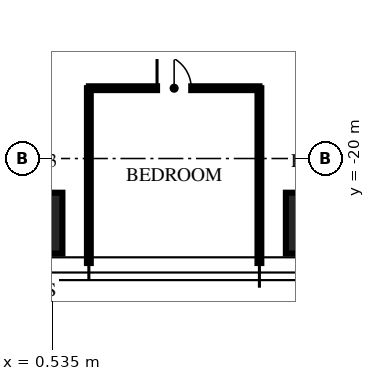
"""IFC4 building model, lengths in metres.
Left out: names, types, materials, properties, quantities, classifications, styles, units other than length and angle.
Written with IfcOpenShell. Run it as: python <this file> out.ifc"""

import sys

from ifc_helpers import new_model, si_unit, direction, frame, frame_2d, origin, origin_2d, place, context, subcontext, project, spatial, rectangle, extrude, element, fill, save


model = new_model("IFC4")
c1 = context("Model", 3, precision=1e-05, world=origin(), true_north=direction((0.0, 1.0)))
c2 = subcontext(c1, "Body", "Model", "MODEL_VIEW")
j1 = project(units=[si_unit("LENGTHUNIT", "METRE"), si_unit("PLANEANGLEUNIT", "RADIAN")], contexts=[c1])
p1 = place(None, origin())
s1 = spatial("IfcSite", under=j1, at=p1, CompositionType="ELEMENT")
p2 = place(p1, origin())
s2 = spatial("IfcBuilding", under=s1, at=p2, CompositionType="ELEMENT")
p3 = place(p2, frame((0.0, 0.0, 342.0)))
s3 = spatial("IfcBuildingStorey", under=s2, at=p3, CompositionType="ELEMENT", Elevation=342.0)
for number, where, z_axis, x_axis in (
    (1, (7.48, -21.7, 0.0), (0.0, 0.0, 1.0), (1.0, 0.0, 0.0)),
    (2, (0.0, -21.7, 0.0), (0.0, 0.0, 1.0), (1.0, 0.0, 0.0)),
):
    element("IfcColumn", number, at=place(p3, frame(where, z_axis=z_axis, x_axis=x_axis)), inside=s3, PredefinedType="COLUMN", context=c2, shape_type="SweptSolid", body=[
        extrude(rectangle(XDim=1.6, YDim=1.6, at=origin_2d()), origin(), (0.0, 0.0, 1.0), 3.75),
    ])
for number, where, z_axis, x_axis in (
    (3, (1.496, -18.15, 0.0), (0.0, 0.0, 1.0), (0.0, -1.0, 0.0)),
    (4, (5.984, -18.15, 0.0), (0.0, 0.0, 1.0), (0.0, -1.0, 0.0)),
):
    element("IfcWall", number, at=place(p3, frame(where, z_axis=z_axis, x_axis=x_axis)), inside=s3, PredefinedType="PARTITIONING", context=c2, shape_type="SweptSolid", body=[
        extrude(rectangle(XDim=4.6, YDim=0.1, at=frame_2d((2.3, 0.0))), origin(), (0.0, 0.0, 1.0), 3.01),
    ])
p4 = place(p3, frame((1.496, -18.15, 0.0), z_axis=(0.0, 0.0, 1.0), x_axis=(1.0, 0.0, 0.0)))
e5 = element("IfcWall", 5, at=p4, inside=s3, PredefinedType="PARTITIONING", context=c2, shape_type="SweptSolid", body=[
    extrude(rectangle(XDim=4.488, YDim=0.1, at=frame_2d((2.244, 0.0))), origin(), (0.0, 0.0, 1.0), 2.91),
])
p5 = place(p4, frame((1.794, 0.0, 0.0)))
e6 = element("IfcOpeningElement", 6, at=p5, cuts=e5, PredefinedType="OPENING", context=c2, shape_type="SweptSolid", body=[
    extrude(rectangle(XDim=0.9, YDim=2.1, at=frame_2d((0.45, 1.05))), frame((0.0, 0.06, 0.0), z_axis=(0.0, -1.0, 0.0), x_axis=(1.0, 0.0, 0.0)), (0.0, 0.0, 1.0), 0.12),
])
p6 = place(p5, origin())
e7 = element("IfcDoor", 7, at=p6, inside=s3, OperationType="SINGLE_SWING_LEFT", PredefinedType="DOOR", context=c2, shape_type="SweptSolid", body=[
    extrude(rectangle(XDim=0.9, YDim=2.1, at=frame_2d((0.45, 1.05))), frame((0.0, 0.025, 0.0), z_axis=(0.0, -1.0, 0.0), x_axis=(1.0, 0.0, 0.0)), (0.0, 0.0, 1.0), 0.05),
])
fill(e6, e7)
save(model, sys.argv[1])
